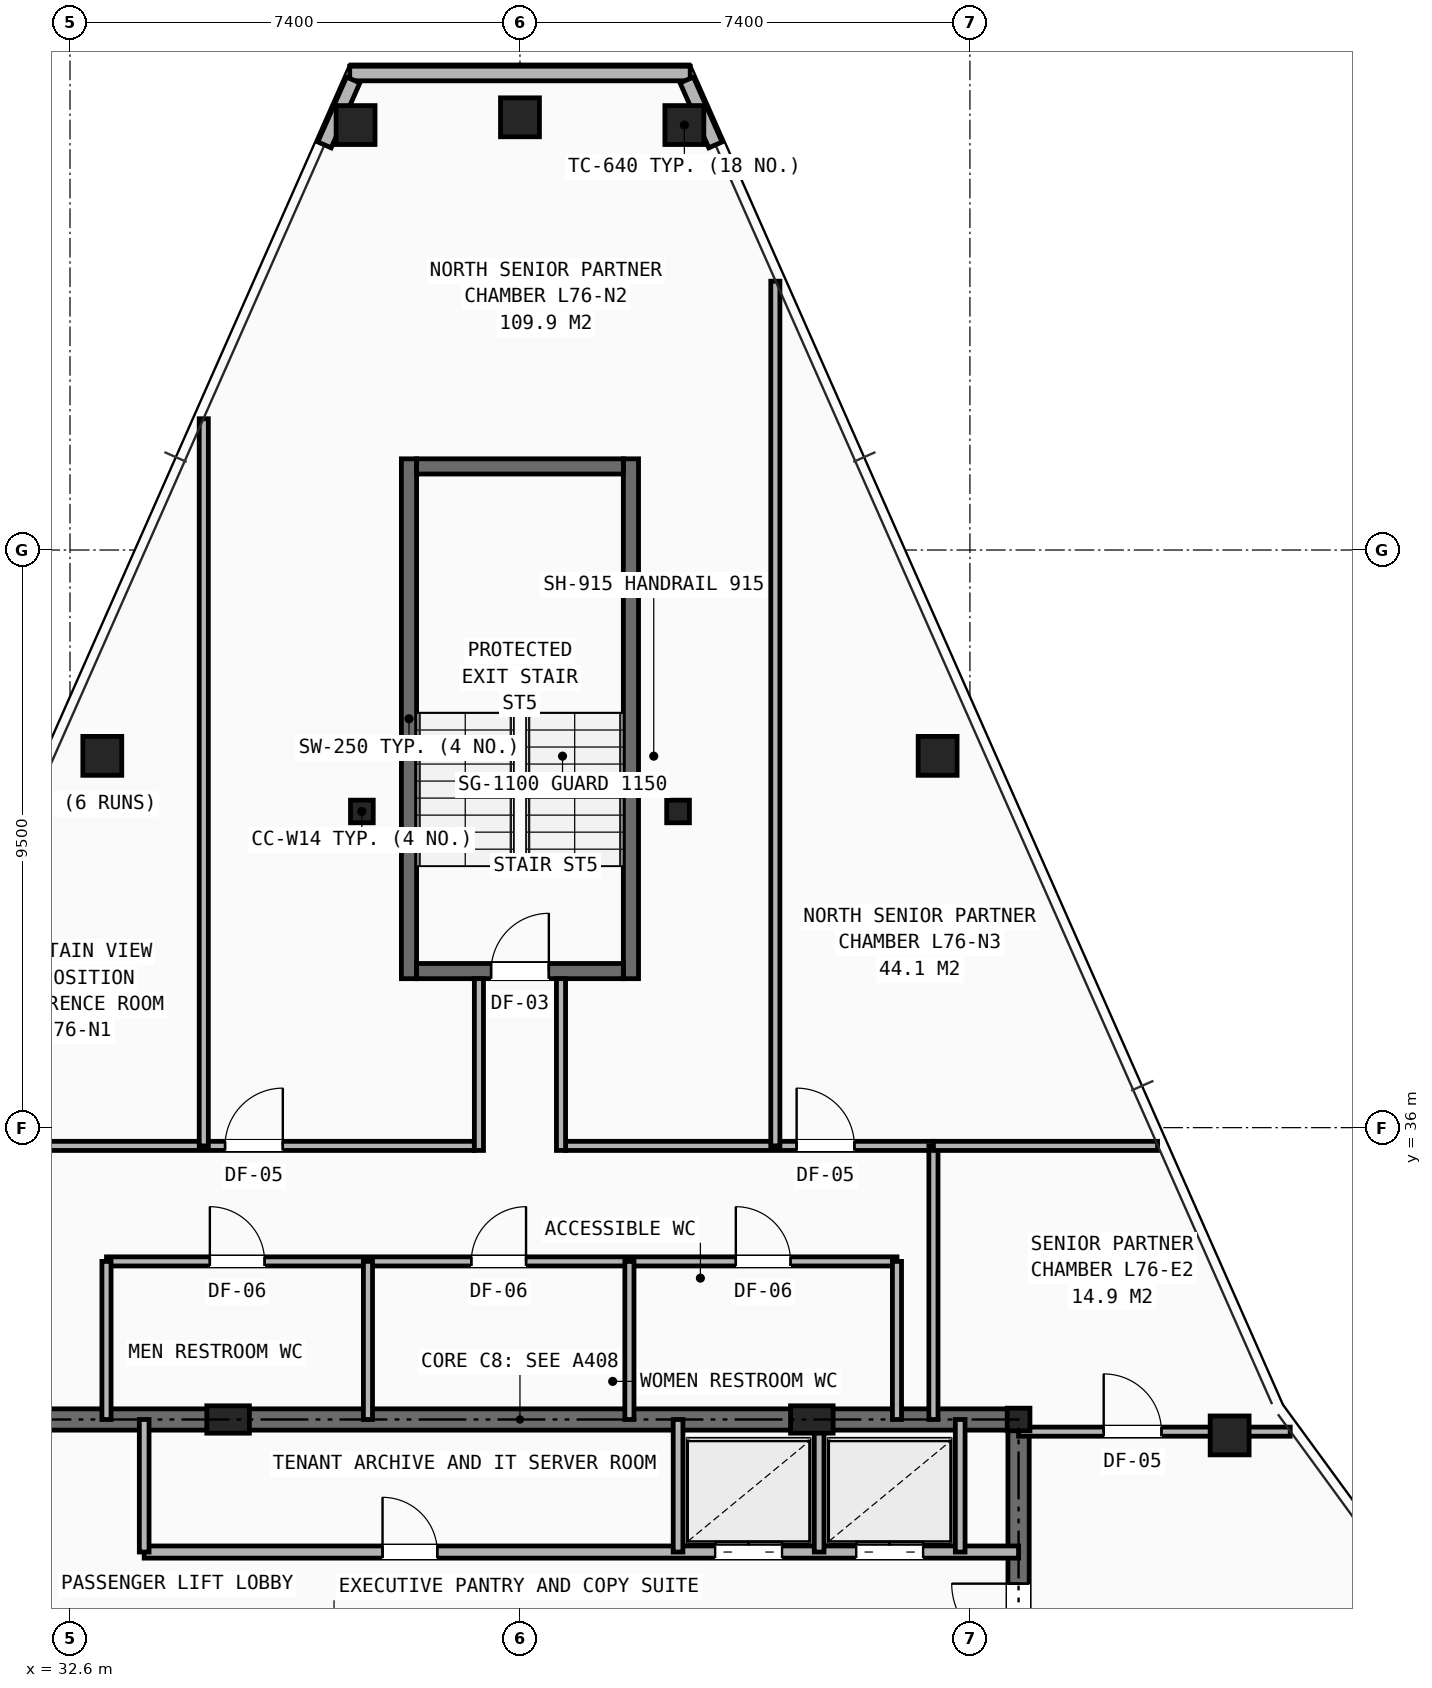
"""IFC4 building model, lengths in metres.
Left out: names, types, materials, properties, quantities, classifications, styles, units other than length and angle.
Written with IfcOpenShell. Run it as: python <this file> out.ifc"""

import sys

from ifc_helpers import new_model, si_unit, direction, frame, frame_2d, origin, origin_2d, place, context, subcontext, project, spatial, rectangle, hollow_rectangle, i_section, extrude, element, fill, save


model = new_model("IFC4")
c1 = context("Model", 3, precision=1e-05, world=origin(), true_north=direction((0.0, 1.0)))
c2 = subcontext(c1, "Body", "Model", "MODEL_VIEW")
j1 = project(units=[si_unit("LENGTHUNIT", "METRE"), si_unit("PLANEANGLEUNIT", "RADIAN")], contexts=[c1])
p1 = place(None, origin())
s1 = spatial("IfcSite", under=j1, at=p1, CompositionType="ELEMENT")
p2 = place(p1, origin())
s2 = spatial("IfcBuilding", under=s1, at=p2, CompositionType="ELEMENT")
p3 = place(p2, frame((0.0, 0.0, 269.0)))
s3 = spatial("IfcBuildingStorey", under=s2, at=p3, CompositionType="ELEMENT", Elevation=269.0)
for number, where, z_axis, x_axis in (
    (1, (48.2, 31.2, 0.0), (0.0, 0.0, 1.0), (1.0, 0.0, 0.0)),
    (2, (37.4, 41.2, 0.0), (0.0, 0.0, 1.0), (1.0, 0.0, 0.0)),
    (3, (42.6, 41.2, 0.0), (0.0, 0.0, 1.0), (1.0, 0.0, 0.0)),
):
    element("IfcColumn", number, at=place(p3, frame(where, z_axis=z_axis, x_axis=x_axis)), inside=s3, PredefinedType="COLUMN", context=c2, shape_type="SweptSolid", body=[
        extrude(i_section(OverallWidth=0.374, OverallDepth=0.372, WebThickness=0.016, FlangeThickness=0.026, at=origin_2d()), origin(), (0.0, 0.0, 1.0), 3.5),
    ])
for number, where, z_axis, x_axis in (
    (4, (35.2, 31.2, 0.0), (0.0, 0.0, 1.0), (1.0, 0.0, 0.0)),
    (5, (44.8, 31.2, 0.0), (0.0, 0.0, 1.0), (1.0, 0.0, 0.0)),
):
    element("IfcColumn", number, at=place(p3, frame(where, z_axis=z_axis, x_axis=x_axis)), inside=s3, PredefinedType="PILASTER", context=c2, shape_type="SweptSolid", body=[
        extrude(rectangle(XDim=0.7, YDim=0.45, at=origin_2d()), origin(), (0.0, 0.0, 1.0), 3.5),
    ])
for number, where, z_axis, x_axis in (
    (6, (42.704, 52.49, 0.0), (0.0, 0.0, 1.0), (1.0, 0.0, 0.0)),
    (7, (40.0, 52.617, 0.0), (0.0, 0.0, 1.0), (1.0, 0.0, 0.0)),
    (8, (37.296, 52.49, 0.0), (0.0, 0.0, 1.0), (1.0, 0.0, 0.0)),
    (9, (33.131, 42.115, 0.0), (0.0, 0.0, 1.0), (1.0, 0.0, 0.0)),
    (10, (51.671, 30.938, 0.0), (0.0, 0.0, 1.0), (1.0, 0.0, 0.0)),
    (11, (46.869, 42.115, 0.0), (0.0, 0.0, 1.0), (1.0, 0.0, 0.0)),
):
    element("IfcColumn", number, at=place(p3, frame(where, z_axis=z_axis, x_axis=x_axis)), inside=s3, PredefinedType="COLUMN", context=c2, shape_type="SweptSolid", body=[
        extrude(hollow_rectangle(XDim=0.64, YDim=0.64, WallThickness=0.045, at=origin_2d()), origin(), (0.0, 0.0, 1.0), 3.5),
    ])
p4 = place(p3, frame((37.2, 53.337, 0.0), z_axis=(0.0, 0.0, 1.0), x_axis=(1.0, 0.0, 0.0)))
e12 = element("IfcWall", 12, at=p4, inside=s3, PredefinedType="SHEAR", context=c2, shape_type="SweptSolid", body=[
    extrude(rectangle(XDim=5.6, YDim=0.24, at=frame_2d((2.8, 0.0))), origin(), (0.0, 0.0, 1.0), 2.623),
])
for number, where, z_axis, x_axis in (
    (13, (37.257, 53.231, 0.0), (0.0, 0.0, 1.0), (-0.404, -0.915, 0.0)),
    (14, (43.215, 52.163, 0.0), (0.0, 0.0, 1.0), (-0.404, 0.915, 0.0)),
):
    element("IfcWall", number, at=place(p3, frame(where, z_axis=z_axis, x_axis=x_axis)), inside=s3, PredefinedType="SHEAR", context=c2, shape_type="SweptSolid", body=[
        extrude(rectangle(XDim=1.168, YDim=0.24, at=frame_2d((0.584, 0.0))), origin(), (0.0, 0.0, 1.0), 2.623),
    ])
p5 = place(p3, frame((31.8, 31.2, 0.0), z_axis=(0.0, 0.0, 1.0), x_axis=(1.0, 0.0, 0.0)))
e15 = element("IfcWall", 15, at=p5, inside=s3, PredefinedType="SHEAR", context=c2, shape_type="SweptSolid", body=[
    extrude(rectangle(XDim=16.4, YDim=0.35, at=frame_2d((8.2, 0.0))), origin(), (0.0, 0.0, 1.0), 3.25),
])
p6 = place(p3, frame((48.2, 16.4, 0.0), z_axis=(0.0, 0.0, 1.0), x_axis=(0.0, 1.0, 0.0)))
e16 = element("IfcWall", 16, at=p6, inside=s3, PredefinedType="SHEAR", context=c2, shape_type="SweptSolid", body=[
    extrude(rectangle(XDim=14.8, YDim=0.35, at=frame_2d((7.4, 0.0))), origin(), (0.0, 0.0, 1.0), 3.25),
])
p7 = place(p6, frame((11.0, 0.0, 0.0)))
e17 = element("IfcOpeningElement", 17, at=p7, cuts=e16, PredefinedType="OPENING", context=c2, shape_type="SweptSolid", body=[
    extrude(rectangle(XDim=1.1, YDim=2.15, at=frame_2d((0.55, 1.075))), frame((0.0, 0.185, 0.0), z_axis=(0.0, -1.0, 0.0), x_axis=(1.0, 0.0, 0.0)), (0.0, 0.0, 1.0), 0.37),
])
p8 = place(p3, frame((33.82, 29.02, 0.0), z_axis=(0.0, 0.0, 1.0), x_axis=(1.0, 0.0, 0.0)))
e18 = element("IfcWall", 18, at=p8, inside=s3, PredefinedType="SOLIDWALL", context=c2, shape_type="SweptSolid", body=[
    extrude(rectangle(XDim=14.38, YDim=0.2, at=frame_2d((7.19, 0.0))), origin(), (0.0, 0.0, 1.0), 2.705),
])
p9 = place(p8, frame((3.92, 0.0, 0.0)))
e19 = element("IfcOpeningElement", 19, at=p9, cuts=e18, PredefinedType="OPENING", context=c2, shape_type="SweptSolid", body=[
    extrude(rectangle(XDim=0.9, YDim=2.1, at=frame_2d((0.45, 1.05))), frame((0.0, 0.11, 0.0), z_axis=(0.0, -1.0, 0.0), x_axis=(1.0, 0.0, 0.0)), (0.0, 0.0, 1.0), 0.22),
])
p10 = place(p8, frame((9.39, 0.0, 0.0)))
e20 = element("IfcOpeningElement", 20, at=p10, cuts=e18, PredefinedType="OPENING", context=c2, shape_type="SweptSolid", body=[
    extrude(rectangle(XDim=1.1, YDim=2.15, at=frame_2d((0.55, 1.075))), frame((0.0, 0.11, 0.0), z_axis=(0.0, -1.0, 0.0), x_axis=(1.0, 0.0, 0.0)), (0.0, 0.0, 1.0), 0.22),
])
p11 = place(p8, frame((11.71, 0.0, 0.0)))
e21 = element("IfcOpeningElement", 21, at=p11, cuts=e18, PredefinedType="OPENING", context=c2, shape_type="SweptSolid", body=[
    extrude(rectangle(XDim=1.1, YDim=2.15, at=frame_2d((0.55, 1.075))), frame((0.0, 0.11, 0.0), z_axis=(0.0, -1.0, 0.0), x_axis=(1.0, 0.0, 0.0)), (0.0, 0.0, 1.0), 0.22),
])
for number, where, z_axis, x_axis in (
    (22, (33.82, 29.02, 0.0), (0.0, 0.0, 1.0), (0.0, 1.0, 0.0)),
    (23, (42.6, 29.02, 0.0), (0.0, 0.0, 1.0), (0.0, 1.0, 0.0)),
    (24, (44.92, 29.02, 0.0), (0.0, 0.0, 1.0), (0.0, 1.0, 0.0)),
    (25, (47.24, 29.02, 0.0), (0.0, 0.0, 1.0), (0.0, 1.0, 0.0)),
):
    element("IfcWall", number, at=place(p3, frame(where, z_axis=z_axis, x_axis=x_axis)), inside=s3, PredefinedType="SOLIDWALL", context=c2, shape_type="SweptSolid", body=[
        extrude(rectangle(XDim=2.18, YDim=0.16, at=frame_2d((1.09, 0.0))), origin(), (0.0, 0.0, 1.0), 2.705),
    ])
p12 = place(p3, frame((33.2, 33.8, 0.0), z_axis=(0.0, 0.0, 1.0), x_axis=(1.0, 0.0, 0.0)))
e26 = element("IfcWall", 26, at=p12, inside=s3, PredefinedType="PARTITIONING", context=c2, shape_type="SweptSolid", body=[
    extrude(rectangle(XDim=13.0, YDim=0.15, at=frame_2d((6.5, 0.0))), origin(), (0.0, 0.0, 1.0), 3.25),
])
p13 = place(p12, frame((1.7, 0.0, 0.0)))
e27 = element("IfcOpeningElement", 27, at=p13, cuts=e26, PredefinedType="OPENING", context=c2, shape_type="SweptSolid", body=[
    extrude(rectangle(XDim=0.9, YDim=2.1, at=frame_2d((0.45, 1.05))), frame((0.0, 0.085, 0.0), z_axis=(0.0, -1.0, 0.0), x_axis=(1.0, 0.0, 0.0)), (0.0, 0.0, 1.0), 0.17),
])
p14 = place(p12, frame((6.0, 0.0, 0.0)))
e28 = element("IfcOpeningElement", 28, at=p14, cuts=e26, PredefinedType="OPENING", context=c2, shape_type="SweptSolid", body=[
    extrude(rectangle(XDim=0.9, YDim=2.1, at=frame_2d((0.45, 1.05))), frame((0.0, 0.085, 0.0), z_axis=(0.0, -1.0, 0.0), x_axis=(1.0, 0.0, 0.0)), (0.0, 0.0, 1.0), 0.17),
])
p15 = place(p12, frame((10.35, 0.0, 0.0)))
e29 = element("IfcOpeningElement", 29, at=p15, cuts=e26, PredefinedType="OPENING", context=c2, shape_type="SweptSolid", body=[
    extrude(rectangle(XDim=0.9, YDim=2.1, at=frame_2d((0.45, 1.05))), frame((0.0, 0.085, 0.0), z_axis=(0.0, -1.0, 0.0), x_axis=(1.0, 0.0, 0.0)), (0.0, 0.0, 1.0), 0.17),
])
for number, where, z_axis, x_axis in (
    (30, (33.2, 31.2, 0.0), (0.0, 0.0, 1.0), (0.0, 1.0, 0.0)),
    (31, (46.2, 31.2, 0.0), (0.0, 0.0, 1.0), (0.0, 1.0, 0.0)),
    (32, (37.5, 31.2, 0.0), (0.0, 0.0, 1.0), (0.0, 1.0, 0.0)),
    (33, (41.8, 31.2, 0.0), (0.0, 0.0, 1.0), (0.0, 1.0, 0.0)),
):
    element("IfcWall", number, at=place(p3, frame(where, z_axis=z_axis, x_axis=x_axis)), inside=s3, PredefinedType="PARTITIONING", context=c2, shape_type="SweptSolid", body=[
        extrude(rectangle(XDim=2.6, YDim=0.15, at=frame_2d((1.3, 0.0))), origin(), (0.0, 0.0, 1.0), 2.705),
    ])
p16 = place(p3, frame((29.8, 35.7, 0.0), z_axis=(0.0, 0.0, 1.0), x_axis=(1.0, 0.0, 0.0)))
e34 = element("IfcWall", 34, at=p16, inside=s3, PredefinedType="PARTITIONING", context=c2, shape_type="SweptSolid", body=[
    extrude(rectangle(XDim=9.45, YDim=0.15, at=frame_2d((4.725, 0.0))), origin(), (0.0, 0.0, 1.0), 2.628),
])
p17 = place(p16, frame((0.55, 0.0, 0.0)))
e35 = element("IfcOpeningElement", 35, at=p17, cuts=e34, PredefinedType="OPENING", context=c2, shape_type="SweptSolid", body=[
    extrude(rectangle(XDim=0.95, YDim=2.1, at=frame_2d((0.475, 1.05))), frame((0.0, 0.085, 0.0), z_axis=(0.0, -1.0, 0.0), x_axis=(1.0, 0.0, 0.0)), (0.0, 0.0, 1.0), 0.17),
])
p18 = place(p16, frame((5.35, 0.0, 0.0)))
e36 = element("IfcOpeningElement", 36, at=p18, cuts=e34, PredefinedType="OPENING", context=c2, shape_type="SweptSolid", body=[
    extrude(rectangle(XDim=0.95, YDim=2.1, at=frame_2d((0.475, 1.05))), frame((0.0, 0.085, 0.0), z_axis=(0.0, -1.0, 0.0), x_axis=(1.0, 0.0, 0.0)), (0.0, 0.0, 1.0), 0.17),
])
p19 = place(p3, frame((40.75, 35.7, 0.0), z_axis=(0.0, 0.0, 1.0), x_axis=(1.0, 0.0, 0.0)))
e37 = element("IfcWall", 37, at=p19, inside=s3, PredefinedType="PARTITIONING", context=c2, shape_type="SweptSolid", body=[
    extrude(rectangle(XDim=6.05, YDim=0.15, at=frame_2d((3.025, 0.0))), origin(), (0.0, 0.0, 1.0), 3.25),
])
p20 = place(p19, frame((3.8, 0.0, 0.0)))
e38 = element("IfcOpeningElement", 38, at=p20, cuts=e37, PredefinedType="OPENING", context=c2, shape_type="SweptSolid", body=[
    extrude(rectangle(XDim=0.95, YDim=2.1, at=frame_2d((0.475, 1.05))), frame((0.0, 0.085, 0.0), z_axis=(0.0, -1.0, 0.0), x_axis=(1.0, 0.0, 0.0)), (0.0, 0.0, 1.0), 0.17),
])
p21 = place(p3, frame((46.8, 31.2, 0.0), z_axis=(0.0, 0.0, 1.0), x_axis=(0.0, 1.0, 0.0)))
e39 = element("IfcWall", 39, at=p21, inside=s3, PredefinedType="PARTITIONING", context=c2, shape_type="SweptSolid", body=[
    extrude(rectangle(XDim=4.5, YDim=0.15, at=frame_2d((2.25, 0.0))), origin(), (0.0, 0.0, 1.0), 2.705),
])
p22 = place(p3, frame((46.8, 35.7, 0.0), z_axis=(0.0, 0.0, 1.0), x_axis=(1.0, 0.0, 0.0)))
e40 = element("IfcWall", 40, at=p22, inside=s3, PredefinedType="PARTITIONING", context=c2, shape_type="SweptSolid", body=[
    extrude(rectangle(XDim=3.686, YDim=0.15, at=frame_2d((1.843, 0.0))), origin(), (0.0, 0.0, 1.0), 2.628),
])
p23 = place(p3, frame((48.2, 31.0, 0.0), z_axis=(0.0, 0.0, 1.0), x_axis=(1.0, 0.0, 0.0)))
e41 = element("IfcWall", 41, at=p23, inside=s3, PredefinedType="PARTITIONING", context=c2, shape_type="SweptSolid", body=[
    extrude(rectangle(XDim=4.468, YDim=0.15, at=frame_2d((2.234, 0.0))), origin(), (0.0, 0.0, 1.0), 2.292),
])
p24 = place(p23, frame((1.4, 0.0, 0.0)))
e42 = element("IfcOpeningElement", 42, at=p24, cuts=e41, PredefinedType="OPENING", context=c2, shape_type="SweptSolid", body=[
    extrude(rectangle(XDim=0.95, YDim=2.1, at=frame_2d((0.475, 1.05))), frame((0.0, 0.085, 0.0), z_axis=(0.0, -1.0, 0.0), x_axis=(1.0, 0.0, 0.0)), (0.0, 0.0, 1.0), 0.17),
])
p25 = place(p3, frame((34.8, 35.7, 0.0), z_axis=(0.0, 0.0, 1.0), x_axis=(0.0, 1.0, 0.0)))
e43 = element("IfcWall", 43, at=p25, inside=s3, PredefinedType="PARTITIONING", context=c2, shape_type="SweptSolid", body=[
    extrude(rectangle(XDim=11.959, YDim=0.15, at=frame_2d((5.979, 0.0))), origin(), (0.0, 0.0, 1.0), 2.292),
])
p26 = place(p3, frame((44.2, 35.7, 0.0), z_axis=(0.0, 0.0, 1.0), x_axis=(0.0, 1.0, 0.0)))
e44 = element("IfcWall", 44, at=p26, inside=s3, PredefinedType="PARTITIONING", context=c2, shape_type="SweptSolid", body=[
    extrude(rectangle(XDim=14.221, YDim=0.15, at=frame_2d((7.111, 0.0))), origin(), (0.0, 0.0, 1.0), 2.292),
])
for number, where, z_axis, x_axis in (
    (45, (38.175, 38.45, 0.0), (0.0, 0.0, 1.0), (0.0, 1.0, 0.0)),
    (46, (41.825, 38.45, 0.0), (0.0, 0.0, 1.0), (0.0, 1.0, 0.0)),
):
    element("IfcWall", number, at=place(p3, frame(where, z_axis=z_axis, x_axis=x_axis)), inside=s3, PredefinedType="SHEAR", context=c2, shape_type="SweptSolid", body=[
        extrude(rectangle(XDim=8.55, YDim=0.25, at=frame_2d((4.275, 0.0))), origin(), (0.0, 0.0, 1.0), 3.25),
    ])
p27 = place(p3, frame((38.3, 38.575, 0.0), z_axis=(0.0, 0.0, 1.0), x_axis=(1.0, 0.0, 0.0)))
e47 = element("IfcWall", 47, at=p27, inside=s3, PredefinedType="SHEAR", context=c2, shape_type="SweptSolid", body=[
    extrude(rectangle(XDim=3.4, YDim=0.25, at=frame_2d((1.7, 0.0))), origin(), (0.0, 0.0, 1.0), 3.25),
])
p28 = place(p27, frame((1.225, 0.0, 0.0)))
e48 = element("IfcOpeningElement", 48, at=p28, cuts=e47, PredefinedType="OPENING", context=c2, shape_type="SweptSolid", body=[
    extrude(rectangle(XDim=0.95, YDim=2.1, at=frame_2d((0.475, 1.05))), frame((0.0, 0.135, 0.0), z_axis=(0.0, -1.0, 0.0), x_axis=(1.0, 0.0, 0.0)), (0.0, 0.0, 1.0), 0.27),
])
p29 = place(p3, frame((38.3, 46.875, 0.0), z_axis=(0.0, 0.0, 1.0), x_axis=(1.0, 0.0, 0.0)))
e49 = element("IfcWall", 49, at=p29, inside=s3, PredefinedType="SHEAR", context=c2, shape_type="SweptSolid", body=[
    extrude(rectangle(XDim=3.4, YDim=0.25, at=frame_2d((1.7, 0.0))), origin(), (0.0, 0.0, 1.0), 3.25),
])
for number, where, z_axis, x_axis in (
    (50, (39.325, 35.625, 0.0), (0.0, 0.0, 1.0), (0.0, 1.0, 0.0)),
    (51, (40.675, 35.625, 0.0), (0.0, 0.0, 1.0), (0.0, 1.0, 0.0)),
):
    element("IfcWall", number, at=place(p3, frame(where, z_axis=z_axis, x_axis=x_axis)), inside=s3, PredefinedType="PARTITIONING", context=c2, shape_type="SweptSolid", body=[
        extrude(rectangle(XDim=2.825, YDim=0.15, at=frame_2d((1.413, 0.0))), origin(), (0.0, 0.0, 1.0), 3.25),
    ])
p30 = place(p7, origin())
e52 = element("IfcDoor", 52, at=p30, inside=s3, OperationType="SINGLE_SWING_RIGHT", PredefinedType="DOOR", context=c2, shape_type="SweptSolid", body=[
    extrude(rectangle(XDim=1.1, YDim=2.15, at=frame_2d((0.55, 1.075))), frame((0.0, 0.025, 0.0), z_axis=(0.0, -1.0, 0.0), x_axis=(1.0, 0.0, 0.0)), (0.0, 0.0, 1.0), 0.05),
])
fill(e17, e52)
p31 = place(p9, origin())
e53 = element("IfcDoor", 53, at=p31, inside=s3, OperationType="SINGLE_SWING_LEFT", PredefinedType="DOOR", context=c2, shape_type="SweptSolid", body=[
    extrude(rectangle(XDim=0.9, YDim=2.1, at=frame_2d((0.45, 1.05))), frame((0.0, 0.025, 0.0), z_axis=(0.0, -1.0, 0.0), x_axis=(1.0, 0.0, 0.0)), (0.0, 0.0, 1.0), 0.05),
])
fill(e19, e53)
p32 = place(p10, origin())
e54 = element("IfcDoor", 54, at=p32, inside=s3, OperationType="DOUBLE_DOOR_SLIDING", PredefinedType="DOOR", context=c2, shape_type="SweptSolid", body=[
    extrude(rectangle(XDim=1.1, YDim=2.15, at=frame_2d((0.55, 1.075))), frame((0.0, 0.025, 0.0), z_axis=(0.0, -1.0, 0.0), x_axis=(1.0, 0.0, 0.0)), (0.0, 0.0, 1.0), 0.05),
])
fill(e20, e54)
p33 = place(p11, origin())
e55 = element("IfcDoor", 55, at=p33, inside=s3, OperationType="DOUBLE_DOOR_SLIDING", PredefinedType="DOOR", context=c2, shape_type="SweptSolid", body=[
    extrude(rectangle(XDim=1.1, YDim=2.15, at=frame_2d((0.55, 1.075))), frame((0.0, 0.025, 0.0), z_axis=(0.0, -1.0, 0.0), x_axis=(1.0, 0.0, 0.0)), (0.0, 0.0, 1.0), 0.05),
])
fill(e21, e55)
p34 = place(p13, origin())
e56 = element("IfcDoor", 56, at=p34, inside=s3, OperationType="SINGLE_SWING_LEFT", PredefinedType="DOOR", context=c2, shape_type="SweptSolid", body=[
    extrude(rectangle(XDim=0.9, YDim=2.1, at=frame_2d((0.45, 1.05))), frame((0.0, 0.025, 0.0), z_axis=(0.0, -1.0, 0.0), x_axis=(1.0, 0.0, 0.0)), (0.0, 0.0, 1.0), 0.05),
])
fill(e27, e56)
p35 = place(p14, origin())
e57 = element("IfcDoor", 57, at=p35, inside=s3, OperationType="SINGLE_SWING_RIGHT", PredefinedType="DOOR", context=c2, shape_type="SweptSolid", body=[
    extrude(rectangle(XDim=0.9, YDim=2.1, at=frame_2d((0.45, 1.05))), frame((0.0, 0.025, 0.0), z_axis=(0.0, -1.0, 0.0), x_axis=(1.0, 0.0, 0.0)), (0.0, 0.0, 1.0), 0.05),
])
fill(e28, e57)
p36 = place(p15, origin())
e58 = element("IfcDoor", 58, at=p36, inside=s3, OperationType="SINGLE_SWING_LEFT", PredefinedType="DOOR", context=c2, shape_type="SweptSolid", body=[
    extrude(rectangle(XDim=0.9, YDim=2.1, at=frame_2d((0.45, 1.05))), frame((0.0, 0.025, 0.0), z_axis=(0.0, -1.0, 0.0), x_axis=(1.0, 0.0, 0.0)), (0.0, 0.0, 1.0), 0.05),
])
fill(e29, e58)
p37 = place(p24, origin())
e59 = element("IfcDoor", 59, at=p37, inside=s3, OperationType="SINGLE_SWING_LEFT", PredefinedType="DOOR", context=c2, shape_type="SweptSolid", body=[
    extrude(rectangle(XDim=0.95, YDim=2.1, at=frame_2d((0.475, 1.05))), frame((0.0, 0.025, 0.0), z_axis=(0.0, -1.0, 0.0), x_axis=(1.0, 0.0, 0.0)), (0.0, 0.0, 1.0), 0.05),
])
fill(e42, e59)
p38 = place(p18, origin())
e60 = element("IfcDoor", 60, at=p38, inside=s3, OperationType="SINGLE_SWING_RIGHT", PredefinedType="DOOR", context=c2, shape_type="SweptSolid", body=[
    extrude(rectangle(XDim=0.95, YDim=2.1, at=frame_2d((0.475, 1.05))), frame((0.0, 0.025, 0.0), z_axis=(0.0, -1.0, 0.0), x_axis=(1.0, 0.0, 0.0)), (0.0, 0.0, 1.0), 0.05),
])
fill(e36, e60)
p39 = place(p20, origin())
e61 = element("IfcDoor", 61, at=p39, inside=s3, OperationType="SINGLE_SWING_LEFT", PredefinedType="DOOR", context=c2, shape_type="SweptSolid", body=[
    extrude(rectangle(XDim=0.95, YDim=2.1, at=frame_2d((0.475, 1.05))), frame((0.0, 0.025, 0.0), z_axis=(0.0, -1.0, 0.0), x_axis=(1.0, 0.0, 0.0)), (0.0, 0.0, 1.0), 0.05),
])
fill(e38, e61)
p40 = place(p28, origin())
e62 = element("IfcDoor", 62, at=p40, inside=s3, OperationType="SINGLE_SWING_RIGHT", PredefinedType="DOOR", context=c2, shape_type="SweptSolid", body=[
    extrude(rectangle(XDim=0.95, YDim=2.1, at=frame_2d((0.475, 1.05))), frame((0.0, 0.025, 0.0), z_axis=(0.0, -1.0, 0.0), x_axis=(1.0, 0.0, 0.0)), (0.0, 0.0, 1.0), 0.05),
])
fill(e48, e62)
save(model, sys.argv[1])
